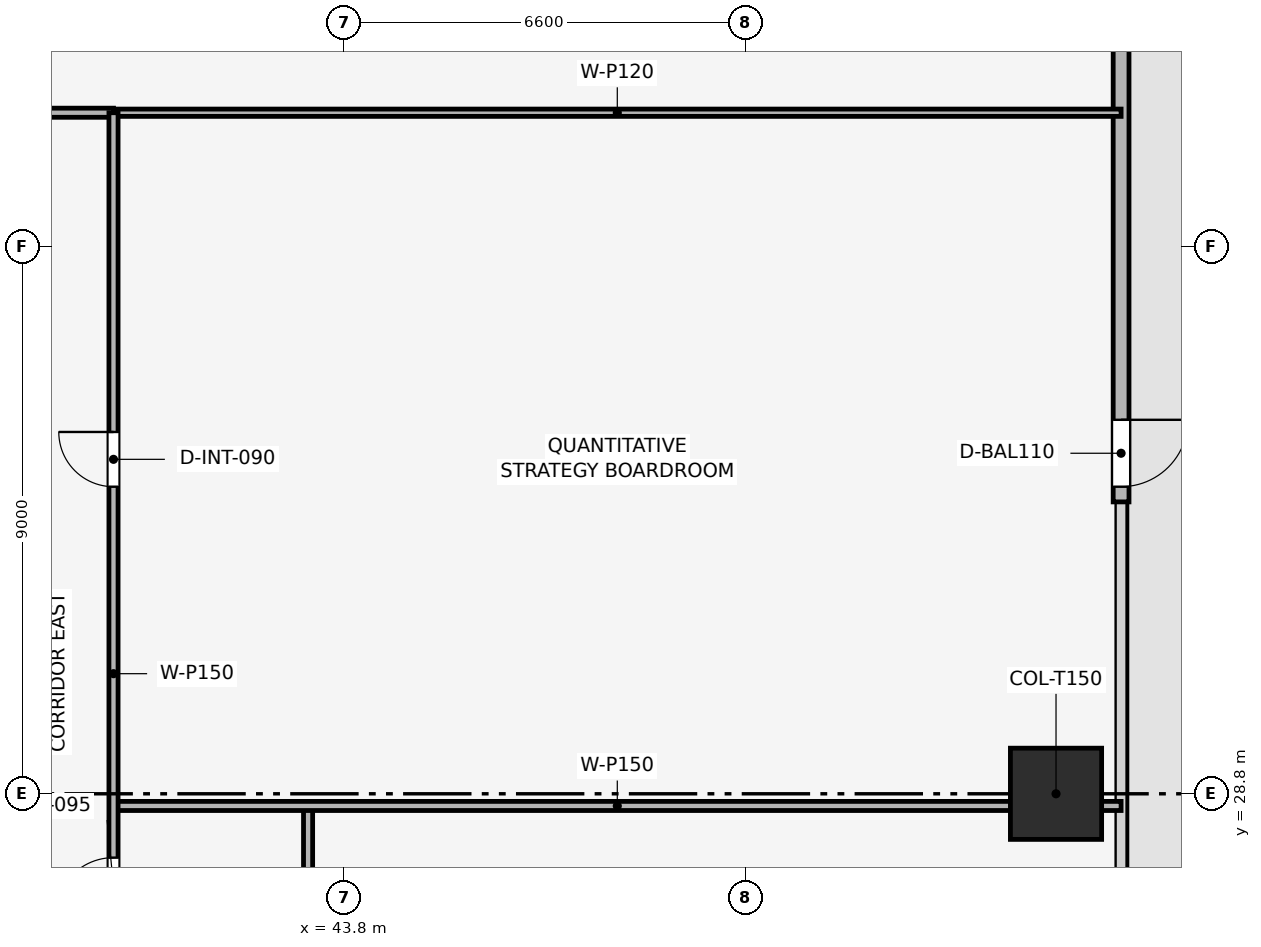
"""IFC4 building model, lengths in metres.
Left out: names, types, materials, properties, quantities, classifications, styles, units other than length and angle.
Written with IfcOpenShell. Run it as: python <this file> out.ifc"""

import sys

from ifc_helpers import new_model, si_unit, direction, frame, frame_2d, origin, origin_2d, place, context, subcontext, project, spatial, rectangle, extrude, element, fill, save


model = new_model("IFC4")
c1 = context("Model", 3, precision=1e-05, world=origin(), true_north=direction((0.0, 1.0)))
c2 = subcontext(c1, "Body", "Model", "MODEL_VIEW")
j1 = project(units=[si_unit("LENGTHUNIT", "METRE"), si_unit("PLANEANGLEUNIT", "RADIAN")], contexts=[c1])
p1 = place(None, origin())
s1 = spatial("IfcSite", under=j1, at=p1, CompositionType="ELEMENT")
p2 = place(p1, origin())
s2 = spatial("IfcBuilding", under=s1, at=p2, CompositionType="ELEMENT")
p3 = place(p2, frame((0.0, 0.0, 33.9)))
s3 = spatial("IfcBuildingStorey", under=s2, at=p3, CompositionType="ELEMENT", Elevation=33.9)
p4 = place(p3, frame((55.5, 28.8, 0.003), z_axis=(0.0, 0.0, 1.0), x_axis=(1.0, 0.0, 0.0)))
e1 = element("IfcColumn", 1, at=p4, inside=s3, PredefinedType="COLUMN", context=c2, shape_type="SweptSolid", body=[
    extrude(rectangle(XDim=1.5, YDim=1.5, at=origin_2d()), origin(), (0.0, 0.0, 1.0), 3.644),
])
p5 = place(p3, frame((56.57, 48.9, 0.0), z_axis=(0.0, 0.0, 1.0), x_axis=(0.0, -1.0, 0.0)))
e2 = element("IfcWall", 2, at=p5, inside=s3, PredefinedType="SOLIDWALL", context=c2, shape_type="SweptSolid", body=[
    extrude(rectangle(XDim=15.3, YDim=0.26, at=frame_2d((7.65, 0.0))), origin(), (0.0, 0.0, 1.0), 3.65),
])
p6 = place(p5, frame((13.95, 0.0, 0.0)))
e3 = element("IfcOpeningElement", 3, at=p6, cuts=e2, PredefinedType="OPENING", context=c2, shape_type="SweptSolid", body=[
    extrude(rectangle(XDim=1.1, YDim=2.2, at=frame_2d((0.55, 1.1))), frame((0.0, 0.14, 0.0), z_axis=(0.0, -1.0, 0.0), x_axis=(1.0, 0.0, 0.0)), (0.0, 0.0, 1.0), 0.28),
])
p7 = place(p3, frame((40.0, 40.0, 0.0), z_axis=(0.0, 0.0, 1.0), x_axis=(1.0, 0.0, 0.0)))
e4 = element("IfcWall", 4, at=p7, inside=s3, PredefinedType="PARTITIONING", context=c2, shape_type="SweptSolid", body=[
    extrude(rectangle(XDim=16.57, YDim=0.12, at=frame_2d((8.285, 0.0))), origin(), (0.0, 0.0, 1.0), 2.935),
])
p8 = place(p3, frame((43.2, 20.2, 0.0), z_axis=(0.0, 0.0, 1.0), x_axis=(0.0, 1.0, 0.0)))
e5 = element("IfcWall", 5, at=p8, inside=s3, PredefinedType="PARTITIONING", context=c2, shape_type="SweptSolid", body=[
    extrude(rectangle(XDim=8.4, YDim=0.15, at=frame_2d((4.2, 0.0))), origin(), (0.0, 0.0, 1.0), 3.085),
])
p9 = place(p3, frame((40.0, 28.6, 0.0), z_axis=(0.0, 0.0, 1.0), x_axis=(1.0, 0.0, 0.0)))
e6 = element("IfcWall", 6, at=p9, inside=s3, PredefinedType="PARTITIONING", context=c2, shape_type="SweptSolid", body=[
    extrude(rectangle(XDim=16.57, YDim=0.15, at=frame_2d((8.285, 0.0))), origin(), (0.0, 0.0, 1.0), 2.935),
])
p10 = place(p3, frame((17.6, 40.0, 0.0), z_axis=(0.0, 0.0, 1.0), x_axis=(1.0, 0.0, 0.0)))
e7 = element("IfcWall", 7, at=p10, inside=s3, PredefinedType="PARTITIONING", context=c2, shape_type="SweptSolid", body=[
    extrude(rectangle(XDim=22.4, YDim=0.15, at=frame_2d((11.2, 0.0))), origin(), (0.0, 0.0, 1.0), 3.085),
])
p11 = place(p10, frame((0.7, 0.0, 0.0)))
e8 = element("IfcOpeningElement", 8, at=p11, cuts=e7, PredefinedType="OPENING", context=c2, shape_type="SweptSolid", body=[
    extrude(rectangle(XDim=0.9, YDim=2.1, at=frame_2d((0.45, 1.05))), frame((0.0, 0.085, 0.0), z_axis=(0.0, -1.0, 0.0), x_axis=(1.0, 0.0, 0.0)), (0.0, 0.0, 1.0), 0.17),
])
p12 = place(p10, frame((4.888, 0.0, 0.0)))
e9 = element("IfcOpeningElement", 9, at=p12, cuts=e7, PredefinedType="OPENING", context=c2, shape_type="SweptSolid", body=[
    extrude(rectangle(XDim=0.9, YDim=2.1, at=frame_2d((0.45, 1.05))), frame((0.0, 0.085, 0.0), z_axis=(0.0, -1.0, 0.0), x_axis=(1.0, 0.0, 0.0)), (0.0, 0.0, 1.0), 0.17),
])
p13 = place(p10, frame((10.808, 0.0, 0.0)))
e10 = element("IfcOpeningElement", 10, at=p13, cuts=e7, PredefinedType="OPENING", context=c2, shape_type="SweptSolid", body=[
    extrude(rectangle(XDim=0.9, YDim=2.1, at=frame_2d((0.45, 1.05))), frame((0.0, 0.085, 0.0), z_axis=(0.0, -1.0, 0.0), x_axis=(1.0, 0.0, 0.0)), (0.0, 0.0, 1.0), 0.17),
])
p14 = place(p10, frame((17.82, 0.0, 0.0)))
e11 = element("IfcOpeningElement", 11, at=p14, cuts=e7, PredefinedType="OPENING", context=c2, shape_type="SweptSolid", body=[
    extrude(rectangle(XDim=0.9, YDim=2.1, at=frame_2d((0.45, 1.05))), frame((0.0, 0.085, 0.0), z_axis=(0.0, -1.0, 0.0), x_axis=(1.0, 0.0, 0.0)), (0.0, 0.0, 1.0), 0.17),
])
p15 = place(p3, frame((40.0, 17.6, 0.0), z_axis=(0.0, 0.0, 1.0), x_axis=(0.0, 1.0, 0.0)))
e12 = element("IfcWall", 12, at=p15, inside=s3, PredefinedType="PARTITIONING", context=c2, shape_type="SweptSolid", body=[
    extrude(rectangle(XDim=22.4, YDim=0.15, at=frame_2d((11.2, 0.0))), origin(), (0.0, 0.0, 1.0), 3.085),
])
p16 = place(p15, frame((0.85, 0.0, 0.0)))
e13 = element("IfcOpeningElement", 13, at=p16, cuts=e12, PredefinedType="OPENING", context=c2, shape_type="SweptSolid", body=[
    extrude(rectangle(XDim=0.9, YDim=2.1, at=frame_2d((0.45, 1.05))), frame((0.0, 0.085, 0.0), z_axis=(0.0, -1.0, 0.0), x_axis=(1.0, 0.0, 0.0)), (0.0, 0.0, 1.0), 0.17),
])
p17 = place(p15, frame((3.55, 0.0, 0.0)))
e14 = element("IfcOpeningElement", 14, at=p17, cuts=e12, PredefinedType="OPENING", context=c2, shape_type="SweptSolid", body=[
    extrude(rectangle(XDim=0.9, YDim=2.1, at=frame_2d((0.45, 1.05))), frame((0.0, 0.085, 0.0), z_axis=(0.0, -1.0, 0.0), x_axis=(1.0, 0.0, 0.0)), (0.0, 0.0, 1.0), 0.17),
])
p18 = place(p15, frame((6.45, 0.0, 0.0)))
e15 = element("IfcOpeningElement", 15, at=p18, cuts=e12, PredefinedType="OPENING", context=c2, shape_type="SweptSolid", body=[
    extrude(rectangle(XDim=0.9, YDim=2.1, at=frame_2d((0.45, 1.05))), frame((0.0, 0.085, 0.0), z_axis=(0.0, -1.0, 0.0), x_axis=(1.0, 0.0, 0.0)), (0.0, 0.0, 1.0), 0.17),
])
p19 = place(p15, frame((9.2, 0.0, 0.0)))
e16 = element("IfcOpeningElement", 16, at=p19, cuts=e12, PredefinedType="OPENING", context=c2, shape_type="SweptSolid", body=[
    extrude(rectangle(XDim=0.95, YDim=2.1, at=frame_2d((0.475, 1.05))), frame((0.0, 0.085, 0.0), z_axis=(0.0, -1.0, 0.0), x_axis=(1.0, 0.0, 0.0)), (0.0, 0.0, 1.0), 0.17),
])
p20 = place(p15, frame((16.25, 0.0, 0.0)))
e17 = element("IfcOpeningElement", 17, at=p20, cuts=e12, PredefinedType="OPENING", context=c2, shape_type="SweptSolid", body=[
    extrude(rectangle(XDim=0.9, YDim=2.1, at=frame_2d((0.45, 1.05))), frame((0.0, 0.085, 0.0), z_axis=(0.0, -1.0, 0.0), x_axis=(1.0, 0.0, 0.0)), (0.0, 0.0, 1.0), 0.17),
])
p21 = place(p6, origin())
e18 = element("IfcDoor", 18, at=p21, inside=s3, OperationType="SINGLE_SWING_LEFT", PredefinedType="DOOR", context=c2, shape_type="SweptSolid", body=[
    extrude(rectangle(XDim=1.1, YDim=2.2, at=frame_2d((0.55, 1.1))), frame((0.0, 0.025, 0.0), z_axis=(0.0, -1.0, 0.0), x_axis=(1.0, 0.0, 0.0)), (0.0, 0.0, 1.0), 0.05),
])
fill(e3, e18)
p22 = place(p19, origin())
e19 = element("IfcDoor", 19, at=p22, inside=s3, OperationType="SINGLE_SWING_LEFT", PredefinedType="DOOR", context=c2, shape_type="SweptSolid", body=[
    extrude(rectangle(XDim=0.95, YDim=2.1, at=frame_2d((0.475, 1.05))), frame((0.0, 0.025, 0.0), z_axis=(0.0, -1.0, 0.0), x_axis=(1.0, 0.0, 0.0)), (0.0, 0.0, 1.0), 0.05),
])
fill(e16, e19)
p23 = place(p20, origin())
e20 = element("IfcDoor", 20, at=p23, inside=s3, OperationType="SINGLE_SWING_RIGHT", PredefinedType="DOOR", context=c2, shape_type="SweptSolid", body=[
    extrude(rectangle(XDim=0.9, YDim=2.1, at=frame_2d((0.45, 1.05))), frame((0.0, 0.025, 0.0), z_axis=(0.0, -1.0, 0.0), x_axis=(1.0, 0.0, 0.0)), (0.0, 0.0, 1.0), 0.05),
])
fill(e17, e20)
save(model, sys.argv[1])
